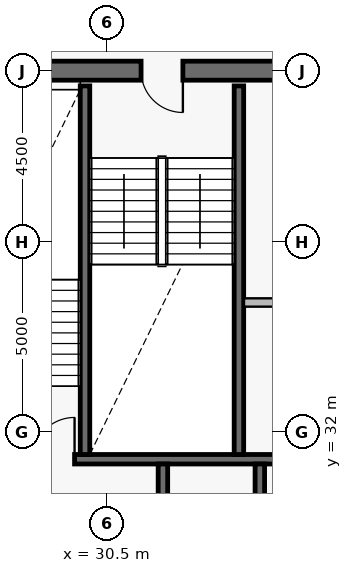
"""IFC4 building model, lengths in metres.
Left out: names, types, materials, properties, quantities, classifications, styles, units other than length and angle.
Written with IfcOpenShell. Run it as: python <this file> out.ifc"""

import sys

from ifc_helpers import new_model, si_unit, direction, frame, frame_2d, origin, place, context, subcontext, project, spatial, rectangle, extrude, element, fill, save


model = new_model("IFC4")
c1 = context("Model", 3, precision=1e-05, world=origin(), true_north=direction((0.0, 1.0)))
c2 = subcontext(c1, "Body", "Model", "MODEL_VIEW")
j1 = project(units=[si_unit("LENGTHUNIT", "METRE"), si_unit("PLANEANGLEUNIT", "RADIAN")], contexts=[c1])
p1 = place(None, origin())
s1 = spatial("IfcSite", under=j1, at=p1, CompositionType="ELEMENT")
p2 = place(p1, origin())
s2 = spatial("IfcBuilding", under=s1, at=p2, CompositionType="ELEMENT")
p3 = place(p2, frame((0.0, 0.0, 331.0)))
s3 = spatial("IfcBuildingStorey", under=s2, at=p3, CompositionType="ELEMENT", Elevation=331.0)
p4 = place(p3, frame((36.75, 41.5, 0.0), z_axis=(0.0, 0.0, 1.0), x_axis=(-1.0, 0.0, 0.0)))
e1 = element("IfcWall", 1, at=p4, inside=s3, PredefinedType="SHEAR", context=c2, shape_type="SweptSolid", body=[
    extrude(rectangle(XDim=11.5, YDim=0.5, at=frame_2d((5.75, 0.0))), origin(), (0.0, 0.0, 1.0), 3.8),
])
p5 = place(p4, frame((4.25, 0.0, 0.0)))
e2 = element("IfcOpeningElement", 2, at=p5, cuts=e1, PredefinedType="OPENING", context=c2, shape_type="SweptSolid", body=[
    extrude(rectangle(XDim=1.1, YDim=2.15, at=frame_2d((0.55, 1.075))), frame((0.0, 0.262, 0.0), z_axis=(0.0, -1.0, 0.0), x_axis=(1.0, 0.0, 0.0)), (0.0, 0.0, 1.0), 0.524),
])
p6 = place(p3, frame((25.95, 31.275, 0.0), z_axis=(0.0, 0.0, 1.0), x_axis=(1.0, 0.0, 0.0)))
e3 = element("IfcWall", 3, at=p6, inside=s3, PredefinedType="SOLIDWALL", context=c2, shape_type="SweptSolid", body=[
    extrude(rectangle(XDim=20.1, YDim=0.25, at=frame_2d((10.05, 0.0))), origin(), (0.0, 0.0, 1.0), 3.8),
])
p7 = place(p6, frame((2.6, 0.0, 0.0)))
e4 = element("IfcOpeningElement", 4, at=p7, cuts=e3, PredefinedType="OPENING", context=c2, shape_type="SweptSolid", body=[
    extrude(rectangle(XDim=1.1, YDim=2.15, at=frame_2d((0.55, 1.075))), frame((0.0, 0.137, 0.0), z_axis=(0.0, -1.0, 0.0), x_axis=(1.0, 0.0, 0.0)), (0.0, 0.0, 1.0), 0.274),
])
p8 = place(p6, frame((10.6, 0.0, 0.0)))
e5 = element("IfcOpeningElement", 5, at=p8, cuts=e3, PredefinedType="OPENING", context=c2, shape_type="SweptSolid", body=[
    extrude(rectangle(XDim=1.1, YDim=2.15, at=frame_2d((0.55, 1.075))), frame((0.0, 0.137, 0.0), z_axis=(0.0, -1.0, 0.0), x_axis=(1.0, 0.0, 0.0)), (0.0, 0.0, 1.0), 0.274),
])
p9 = place(p6, frame((16.35, 0.0, 0.0)))
e6 = element("IfcOpeningElement", 6, at=p9, cuts=e3, PredefinedType="OPENING", context=c2, shape_type="SweptSolid", body=[
    extrude(rectangle(XDim=1.1, YDim=2.15, at=frame_2d((0.55, 1.075))), frame((0.0, 0.137, 0.0), z_axis=(0.0, -1.0, 0.0), x_axis=(1.0, 0.0, 0.0)), (0.0, 0.0, 1.0), 0.274),
])
for number, where, z_axis, x_axis in (
    (7, (29.925, 31.4, 0.0), (0.0, 0.0, 1.0), (0.0, 1.0, 0.0)),
    (8, (33.975, 31.4, 0.0), (0.0, 0.0, 1.0), (0.0, 1.0, 0.0)),
):
    element("IfcWall", number, at=place(p3, frame(where, z_axis=z_axis, x_axis=x_axis)), inside=s3, PredefinedType="SOLIDWALL", context=c2, shape_type="SweptSolid", body=[
        extrude(rectangle(XDim=9.7, YDim=0.25, at=frame_2d((4.85, 0.0))), origin(), (0.0, 0.0, 1.0), 3.8),
    ])
p10 = place(p3, frame((31.975, 22.95, 0.0), z_axis=(0.0, 0.0, 1.0), x_axis=(0.0, 1.0, 0.0)))
e9 = element("IfcWall", 9, at=p10, inside=s3, PredefinedType="SOLIDWALL", context=c2, shape_type="SweptSolid", body=[
    extrude(rectangle(XDim=8.2, YDim=0.25, at=frame_2d((4.1, 0.0))), origin(), (0.0, 0.0, 1.0), 3.8),
])
p11 = place(p3, frame((34.525, 22.95, 0.0), z_axis=(0.0, 0.0, 1.0), x_axis=(0.0, 1.0, 0.0)))
e10 = element("IfcWall", 10, at=p11, inside=s3, PredefinedType="SOLIDWALL", context=c2, shape_type="SweptSolid", body=[
    extrude(rectangle(XDim=8.2, YDim=0.25, at=frame_2d((4.1, 0.0))), origin(), (0.0, 0.0, 1.0), 3.8),
])
p12 = place(p11, frame((1.45, 0.0, 0.0)))
e11 = element("IfcOpeningElement", 11, at=p12, cuts=e10, PredefinedType="OPENING", context=c2, shape_type="SweptSolid", body=[
    extrude(rectangle(XDim=0.9, YDim=2.1, at=frame_2d((0.45, 1.05))), frame((0.0, 0.137, 0.0), z_axis=(0.0, -1.0, 0.0), x_axis=(1.0, 0.0, 0.0)), (0.0, 0.0, 1.0), 0.274),
])
p13 = place(p11, frame((5.65, 0.0, 0.0)))
e12 = element("IfcOpeningElement", 12, at=p13, cuts=e10, PredefinedType="OPENING", context=c2, shape_type="SweptSolid", body=[
    extrude(rectangle(XDim=0.9, YDim=2.1, at=frame_2d((0.45, 1.05))), frame((0.0, 0.137, 0.0), z_axis=(0.0, -1.0, 0.0), x_axis=(1.0, 0.0, 0.0)), (0.0, 0.0, 1.0), 0.274),
])
p14 = place(p3, frame((34.108, 35.4, 0.0), z_axis=(0.0, 0.0, 1.0), x_axis=(1.0, 0.0, 0.0)))
e13 = element("IfcWall", 13, at=p14, inside=s3, PredefinedType="PARTITIONING", context=c2, shape_type="SweptSolid", body=[
    extrude(rectangle(XDim=2.084, YDim=0.22, at=frame_2d((1.042, 0.0))), origin(), (0.0, 0.0, 1.0), 3.55),
])
p15 = place(p5, origin())
e14 = element("IfcDoor", 14, at=p15, inside=s3, OperationType="SINGLE_SWING_LEFT", PredefinedType="USERDEFINED", context=c2, shape_type="SweptSolid", body=[
    extrude(rectangle(XDim=1.1, YDim=2.15, at=frame_2d((0.55, 1.075))), frame((0.0, 0.025, 0.0), z_axis=(0.0, -1.0, 0.0), x_axis=(1.0, 0.0, 0.0)), (0.0, 0.0, 1.0), 0.05),
])
fill(e2, e14)
p16 = place(p7, origin())
e15 = element("IfcDoor", 15, at=p16, inside=s3, OperationType="SINGLE_SWING_RIGHT", PredefinedType="USERDEFINED", context=c2, shape_type="SweptSolid", body=[
    extrude(rectangle(XDim=1.1, YDim=2.15, at=frame_2d((0.55, 1.075))), frame((0.0, 0.025, 0.0), z_axis=(0.0, -1.0, 0.0), x_axis=(1.0, 0.0, 0.0)), (0.0, 0.0, 1.0), 0.05),
])
fill(e4, e15)
save(model, sys.argv[1])
